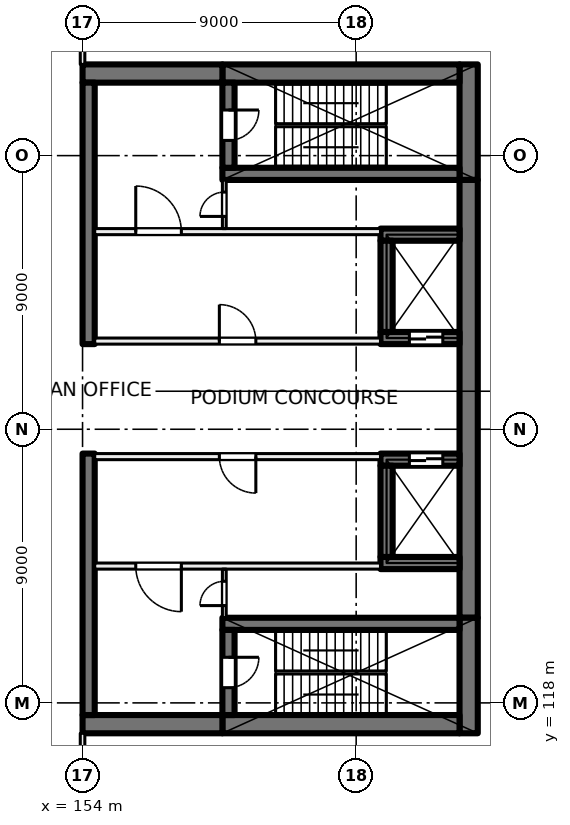
"""IFC4 building model, lengths in metres.
Left out: names, types, materials, properties, quantities, classifications, styles, units other than length and angle.
Written with IfcOpenShell. Run it as: python <this file> out.ifc"""

import sys

from ifc_helpers import new_model, si_unit, direction, frame, frame_2d, origin, place, context, subcontext, project, spatial, rectangle, extrude, element, fill, save


model = new_model("IFC4")
c1 = context("Model", 3, precision=1e-05, world=origin(), true_north=direction((0.0, 1.0)))
c2 = subcontext(c1, "Body", "Model", "MODEL_VIEW")
j1 = project(units=[si_unit("LENGTHUNIT", "METRE"), si_unit("PLANEANGLEUNIT", "RADIAN")], contexts=[c1])
p1 = place(None, origin())
s1 = spatial("IfcSite", under=j1, at=p1, CompositionType="ELEMENT")
p2 = place(p1, origin())
s2 = spatial("IfcBuilding", under=s1, at=p2, CompositionType="ELEMENT")
p3 = place(p2, frame((0.0, 0.0, 17.5)))
s3 = spatial("IfcBuildingStorey", under=s2, at=p3, CompositionType="ELEMENT", Elevation=17.5)
p4 = place(p3, frame((166.7, 139.0, 0.0), z_axis=(0.0, 0.0, 1.0), x_axis=(0.0, -1.0, 0.0)))
e1 = element("IfcWall", 1, at=p4, inside=s3, PredefinedType="SHEAR", context=c2, shape_type="SweptSolid", body=[
    extrude(rectangle(XDim=3.8, YDim=0.6, at=frame_2d((1.9, 0.0))), origin(), (0.0, 0.0, 1.0), 5.0),
])
p5 = place(p3, frame((166.7, 135.2, 0.0), z_axis=(0.0, 0.0, 1.0), x_axis=(0.0, -1.0, 0.0)))
e2 = element("IfcWall", 2, at=p5, inside=s3, PredefinedType="SHEAR", context=c2, shape_type="SweptSolid", body=[
    extrude(rectangle(XDim=14.4, YDim=0.6, at=frame_2d((7.2, 0.0))), origin(), (0.0, 0.0, 1.0), 5.0),
])
p6 = place(p3, frame((166.7, 120.8, 0.0), z_axis=(0.0, 0.0, 1.0), x_axis=(0.0, -1.0, 0.0)))
e3 = element("IfcWall", 3, at=p6, inside=s3, PredefinedType="SHEAR", context=c2, shape_type="SweptSolid", body=[
    extrude(rectangle(XDim=3.8, YDim=0.6, at=frame_2d((1.9, 0.0))), origin(), (0.0, 0.0, 1.0), 5.0),
])
for number, where, z_axis, x_axis in (
    (4, (166.4, 138.7, 0.0), (0.0, 0.0, 1.0), (-1.0, 0.0, 0.0)),
    (5, (166.4, 117.3, 0.0), (0.0, 0.0, 1.0), (-1.0, 0.0, 0.0)),
):
    element("IfcWall", number, at=place(p3, frame(where, z_axis=z_axis, x_axis=x_axis)), inside=s3, PredefinedType="SHEAR", context=c2, shape_type="SweptSolid", body=[
        extrude(rectangle(XDim=7.8, YDim=0.6, at=frame_2d((3.9, 0.0))), origin(), (0.0, 0.0, 1.0), 5.0),
    ])
for number, where, z_axis, x_axis in (
    (6, (158.6, 138.7, 0.0), (0.0, 0.0, 1.0), (-1.0, 0.0, 0.0)),
    (7, (158.6, 117.3, 0.0), (0.0, 0.0, 1.0), (-1.0, 0.0, 0.0)),
):
    element("IfcWall", number, at=place(p3, frame(where, z_axis=z_axis, x_axis=x_axis)), inside=s3, PredefinedType="SHEAR", context=c2, shape_type="SweptSolid", body=[
        extrude(rectangle(XDim=4.6, YDim=0.6, at=frame_2d((2.3, 0.0))), origin(), (0.0, 0.0, 1.0), 5.0),
    ])
p7 = place(p3, frame((166.4, 135.4, 0.0), z_axis=(0.0, 0.0, 1.0), x_axis=(-1.0, 0.0, 0.0)))
e8 = element("IfcWall", 8, at=p7, inside=s3, PredefinedType="SHEAR", context=c2, shape_type="SweptSolid", body=[
    extrude(rectangle(XDim=7.8, YDim=0.4, at=frame_2d((3.9, 0.0))), origin(), (0.0, 0.0, 1.0), 5.0),
])
p8 = place(p3, frame((158.8, 138.4, 0.0), z_axis=(0.0, 0.0, 1.0), x_axis=(0.0, -1.0, 0.0)))
e9 = element("IfcWall", 9, at=p8, inside=s3, PredefinedType="SHEAR", context=c2, shape_type="SweptSolid", body=[
    extrude(rectangle(XDim=2.8, YDim=0.4, at=frame_2d((1.4, 0.0))), origin(), (0.0, 0.0, 1.0), 5.0),
])
p9 = place(p8, frame((0.9, 0.0, 0.0)))
e10 = element("IfcOpeningElement", 10, at=p9, cuts=e9, PredefinedType="OPENING", context=c2, shape_type="SweptSolid", body=[
    extrude(rectangle(XDim=1.0, YDim=2.1, at=frame_2d((0.5, 1.05))), frame((0.0, 0.21, 0.0), z_axis=(0.0, -1.0, 0.0), x_axis=(1.0, 0.0, 0.0)), (0.0, 0.0, 1.0), 0.42),
])
p10 = place(p3, frame((166.4, 120.6, 0.0), z_axis=(0.0, 0.0, 1.0), x_axis=(-1.0, 0.0, 0.0)))
e11 = element("IfcWall", 11, at=p10, inside=s3, PredefinedType="SHEAR", context=c2, shape_type="SweptSolid", body=[
    extrude(rectangle(XDim=7.8, YDim=0.4, at=frame_2d((3.9, 0.0))), origin(), (0.0, 0.0, 1.0), 5.0),
])
p11 = place(p3, frame((158.8, 120.4, 0.0), z_axis=(0.0, 0.0, 1.0), x_axis=(0.0, -1.0, 0.0)))
e12 = element("IfcWall", 12, at=p11, inside=s3, PredefinedType="SHEAR", context=c2, shape_type="SweptSolid", body=[
    extrude(rectangle(XDim=2.8, YDim=0.4, at=frame_2d((1.4, 0.0))), origin(), (0.0, 0.0, 1.0), 5.0),
])
p12 = place(p11, frame((0.9, 0.0, 0.0)))
e13 = element("IfcOpeningElement", 13, at=p12, cuts=e12, PredefinedType="OPENING", context=c2, shape_type="SweptSolid", body=[
    extrude(rectangle(XDim=1.0, YDim=2.1, at=frame_2d((0.5, 1.05))), frame((0.0, 0.21, 0.0), z_axis=(0.0, -1.0, 0.0), x_axis=(1.0, 0.0, 0.0)), (0.0, 0.0, 1.0), 0.42),
])
p13 = place(p3, frame((166.4, 130.0, 0.0), z_axis=(0.0, 0.0, 1.0), x_axis=(-1.0, 0.0, 0.0)))
e14 = element("IfcWall", 14, at=p13, inside=s3, PredefinedType="SHEAR", context=c2, shape_type="SweptSolid", body=[
    extrude(rectangle(XDim=2.6, YDim=0.4, at=frame_2d((1.3, 0.0))), origin(), (0.0, 0.0, 1.0), 5.0),
])
p14 = place(p13, frame((0.55, 0.0, 0.0)))
e15 = element("IfcOpeningElement", 15, at=p14, cuts=e14, PredefinedType="OPENING", context=c2, shape_type="SweptSolid", body=[
    extrude(rectangle(XDim=1.1, YDim=2.1, at=frame_2d((0.55, 1.05))), frame((0.0, 0.21, 0.0), z_axis=(0.0, -1.0, 0.0), x_axis=(1.0, 0.0, 0.0)), (0.0, 0.0, 1.0), 0.42),
])
p15 = place(p3, frame((166.4, 133.4, 0.0), z_axis=(0.0, 0.0, 1.0), x_axis=(-1.0, 0.0, 0.0)))
e16 = element("IfcWall", 16, at=p15, inside=s3, PredefinedType="SHEAR", context=c2, shape_type="SweptSolid", body=[
    extrude(rectangle(XDim=2.6, YDim=0.4, at=frame_2d((1.3, 0.0))), origin(), (0.0, 0.0, 1.0), 5.0),
])
p16 = place(p3, frame((164.0, 133.2, 0.0), z_axis=(0.0, 0.0, 1.0), x_axis=(0.0, -1.0, 0.0)))
e17 = element("IfcWall", 17, at=p16, inside=s3, PredefinedType="SHEAR", context=c2, shape_type="SweptSolid", body=[
    extrude(rectangle(XDim=3.0, YDim=0.4, at=frame_2d((1.5, 0.0))), origin(), (0.0, 0.0, 1.0), 5.0),
])
p17 = place(p3, frame((166.4, 126.0, 0.0), z_axis=(0.0, 0.0, 1.0), x_axis=(-1.0, 0.0, 0.0)))
e18 = element("IfcWall", 18, at=p17, inside=s3, PredefinedType="SHEAR", context=c2, shape_type="SweptSolid", body=[
    extrude(rectangle(XDim=2.6, YDim=0.4, at=frame_2d((1.3, 0.0))), origin(), (0.0, 0.0, 1.0), 5.0),
])
p18 = place(p17, frame((0.55, 0.0, 0.0)))
e19 = element("IfcOpeningElement", 19, at=p18, cuts=e18, PredefinedType="OPENING", context=c2, shape_type="SweptSolid", body=[
    extrude(rectangle(XDim=1.1, YDim=2.1, at=frame_2d((0.55, 1.05))), frame((0.0, 0.21, 0.0), z_axis=(0.0, -1.0, 0.0), x_axis=(1.0, 0.0, 0.0)), (0.0, 0.0, 1.0), 0.42),
])
p19 = place(p3, frame((166.4, 122.6, 0.0), z_axis=(0.0, 0.0, 1.0), x_axis=(-1.0, 0.0, 0.0)))
e20 = element("IfcWall", 20, at=p19, inside=s3, PredefinedType="SHEAR", context=c2, shape_type="SweptSolid", body=[
    extrude(rectangle(XDim=2.6, YDim=0.4, at=frame_2d((1.3, 0.0))), origin(), (0.0, 0.0, 1.0), 5.0),
])
p20 = place(p3, frame((164.0, 125.8, 0.0), z_axis=(0.0, 0.0, 1.0), x_axis=(0.0, -1.0, 0.0)))
e21 = element("IfcWall", 21, at=p20, inside=s3, PredefinedType="SHEAR", context=c2, shape_type="SweptSolid", body=[
    extrude(rectangle(XDim=3.0, YDim=0.4, at=frame_2d((1.5, 0.0))), origin(), (0.0, 0.0, 1.0), 5.0),
])
for number, where, z_axis, x_axis in (
    (22, (154.2, 138.4, 0.0), (0.0, 0.0, 1.0), (0.0, -1.0, 0.0)),
    (23, (154.2, 126.2, 0.0), (0.0, 0.0, 1.0), (0.0, -1.0, 0.0)),
):
    element("IfcWall", number, at=place(p3, frame(where, z_axis=z_axis, x_axis=x_axis)), inside=s3, PredefinedType="SHEAR", context=c2, shape_type="SweptSolid", body=[
        extrude(rectangle(XDim=8.6, YDim=0.4, at=frame_2d((4.3, 0.0))), origin(), (0.0, 0.0, 1.0), 5.0),
    ])
p21 = place(p3, frame((163.8, 126.1, 0.0), z_axis=(0.0, 0.0, 1.0), x_axis=(-1.0, 0.0, 0.0)))
e24 = element("IfcWall", 24, at=p21, inside=s3, PredefinedType="PARTITIONING", context=c2, shape_type="SweptSolid", body=[
    extrude(rectangle(XDim=9.4, YDim=0.2, at=frame_2d((4.7, 0.0))), origin(), (0.0, 0.0, 1.0), 4.6),
])
p22 = place(p21, frame((4.1, 0.0, 0.0)))
e25 = element("IfcOpeningElement", 25, at=p22, cuts=e24, PredefinedType="OPENING", context=c2, shape_type="SweptSolid", body=[
    extrude(rectangle(XDim=1.2, YDim=2.1, at=frame_2d((0.6, 1.05))), frame((0.0, 0.11, 0.0), z_axis=(0.0, -1.0, 0.0), x_axis=(1.0, 0.0, 0.0)), (0.0, 0.0, 1.0), 0.22),
])
p23 = place(p3, frame((163.8, 122.5, 0.0), z_axis=(0.0, 0.0, 1.0), x_axis=(-1.0, 0.0, 0.0)))
e26 = element("IfcWall", 26, at=p23, inside=s3, PredefinedType="PARTITIONING", context=c2, shape_type="SweptSolid", body=[
    extrude(rectangle(XDim=9.4, YDim=0.2, at=frame_2d((4.7, 0.0))), origin(), (0.0, 0.0, 1.0), 4.6),
])
p24 = place(p23, frame((6.55, 0.0, 0.0)))
e27 = element("IfcOpeningElement", 27, at=p24, cuts=e26, PredefinedType="OPENING", context=c2, shape_type="SweptSolid", body=[
    extrude(rectangle(XDim=1.5, YDim=2.1, at=frame_2d((0.75, 1.05))), frame((0.0, 0.11, 0.0), z_axis=(0.0, -1.0, 0.0), x_axis=(1.0, 0.0, 0.0)), (0.0, 0.0, 1.0), 0.22),
])
p25 = place(p3, frame((158.663, 120.8, 0.0), z_axis=(0.0, 0.0, 1.0), x_axis=(0.0, 1.0, 0.0)))
e28 = element("IfcWall", 28, at=p25, inside=s3, PredefinedType="PARTITIONING", context=c2, shape_type="SweptSolid", body=[
    extrude(rectangle(XDim=1.6, YDim=0.125, at=frame_2d((0.8, 0.0))), origin(), (0.0, 0.0, 1.0), 4.6),
])
p26 = place(p25, frame((0.4, 0.0, 0.0)))
e29 = element("IfcOpeningElement", 29, at=p26, cuts=e28, PredefinedType="OPENING", context=c2, shape_type="SweptSolid", body=[
    extrude(rectangle(XDim=0.8, YDim=2.1, at=frame_2d((0.4, 1.05))), frame((0.0, 0.073, 0.0), z_axis=(0.0, -1.0, 0.0), x_axis=(1.0, 0.0, 0.0)), (0.0, 0.0, 1.0), 0.145),
])
p27 = place(p3, frame((154.4, 129.9, 0.0), z_axis=(0.0, 0.0, 1.0), x_axis=(1.0, 0.0, 0.0)))
e30 = element("IfcWall", 30, at=p27, inside=s3, PredefinedType="PARTITIONING", context=c2, shape_type="SweptSolid", body=[
    extrude(rectangle(XDim=9.4, YDim=0.2, at=frame_2d((4.7, 0.0))), origin(), (0.0, 0.0, 1.0), 4.6),
])
p28 = place(p27, frame((4.1, 0.0, 0.0)))
e31 = element("IfcOpeningElement", 31, at=p28, cuts=e30, PredefinedType="OPENING", context=c2, shape_type="SweptSolid", body=[
    extrude(rectangle(XDim=1.2, YDim=2.1, at=frame_2d((0.6, 1.05))), frame((0.0, 0.11, 0.0), z_axis=(0.0, -1.0, 0.0), x_axis=(1.0, 0.0, 0.0)), (0.0, 0.0, 1.0), 0.22),
])
p29 = place(p3, frame((154.4, 133.5, 0.0), z_axis=(0.0, 0.0, 1.0), x_axis=(1.0, 0.0, 0.0)))
e32 = element("IfcWall", 32, at=p29, inside=s3, PredefinedType="PARTITIONING", context=c2, shape_type="SweptSolid", body=[
    extrude(rectangle(XDim=9.4, YDim=0.2, at=frame_2d((4.7, 0.0))), origin(), (0.0, 0.0, 1.0), 4.6),
])
p30 = place(p29, frame((1.35, 0.0, 0.0)))
e33 = element("IfcOpeningElement", 33, at=p30, cuts=e32, PredefinedType="OPENING", context=c2, shape_type="SweptSolid", body=[
    extrude(rectangle(XDim=1.5, YDim=2.1, at=frame_2d((0.75, 1.05))), frame((0.0, 0.11, 0.0), z_axis=(0.0, -1.0, 0.0), x_axis=(1.0, 0.0, 0.0)), (0.0, 0.0, 1.0), 0.22),
])
p31 = place(p3, frame((158.663, 133.6, 0.0), z_axis=(0.0, 0.0, 1.0), x_axis=(0.0, 1.0, 0.0)))
e34 = element("IfcWall", 34, at=p31, inside=s3, PredefinedType="PARTITIONING", context=c2, shape_type="SweptSolid", body=[
    extrude(rectangle(XDim=1.6, YDim=0.125, at=frame_2d((0.8, 0.0))), origin(), (0.0, 0.0, 1.0), 4.6),
])
p32 = place(p31, frame((0.4, 0.0, 0.0)))
e35 = element("IfcOpeningElement", 35, at=p32, cuts=e34, PredefinedType="OPENING", context=c2, shape_type="SweptSolid", body=[
    extrude(rectangle(XDim=0.8, YDim=2.1, at=frame_2d((0.4, 1.05))), frame((0.0, 0.073, 0.0), z_axis=(0.0, -1.0, 0.0), x_axis=(1.0, 0.0, 0.0)), (0.0, 0.0, 1.0), 0.145),
])
p33 = place(p3, frame((154.0, 103.075, 0.0), z_axis=(0.0, 0.0, 1.0), x_axis=(0.0, 1.0, 0.0)))
e36 = element("IfcWall", 36, at=p33, inside=s3, PredefinedType="PARTITIONING", context=c2, shape_type="SweptSolid", body=[
    extrude(rectangle(XDim=13.925, YDim=0.15, at=frame_2d((6.962, 0.0))), origin(), (0.0, 0.0, 1.0), 4.6),
])
p34 = place(p3, frame((154.0, 153.4, 0.0), z_axis=(0.0, 0.0, 1.0), x_axis=(0.0, -1.0, 0.0)))
e37 = element("IfcWall", 37, at=p34, inside=s3, PredefinedType="PARTITIONING", context=c2, shape_type="SweptSolid", body=[
    extrude(rectangle(XDim=14.4, YDim=0.15, at=frame_2d((7.2, 0.0))), origin(), (0.0, 0.0, 1.0), 4.6),
])
p35 = place(p34, frame((11.0, 0.0, 0.0)))
e38 = element("IfcOpeningElement", 38, at=p35, cuts=e37, PredefinedType="OPENING", context=c2, shape_type="SweptSolid", body=[
    extrude(rectangle(XDim=1.8, YDim=2.1, at=frame_2d((0.9, 1.05))), frame((0.0, 0.085, 0.0), z_axis=(0.0, -1.0, 0.0), x_axis=(1.0, 0.0, 0.0)), (0.0, 0.0, 1.0), 0.17),
])
p36 = place(p18, origin())
e39 = element("IfcDoor", 39, at=p36, inside=s3, OperationType="DOUBLE_DOOR_SLIDING", PredefinedType="DOOR", context=c2, shape_type="SweptSolid", body=[
    extrude(rectangle(XDim=1.1, YDim=2.1, at=frame_2d((0.55, 1.05))), frame((0.0, 0.025, 0.0), z_axis=(0.0, -1.0, 0.0), x_axis=(1.0, 0.0, 0.0)), (0.0, 0.0, 1.0), 0.05),
])
fill(e19, e39)
p37 = place(p14, origin())
e40 = element("IfcDoor", 40, at=p37, inside=s3, OperationType="DOUBLE_DOOR_SLIDING", PredefinedType="DOOR", context=c2, shape_type="SweptSolid", body=[
    extrude(rectangle(XDim=1.1, YDim=2.1, at=frame_2d((0.55, 1.05))), frame((0.0, 0.025, 0.0), z_axis=(0.0, -1.0, 0.0), x_axis=(1.0, 0.0, 0.0)), (0.0, 0.0, 1.0), 0.05),
])
fill(e15, e40)
p38 = place(p22, origin())
e41 = element("IfcDoor", 41, at=p38, inside=s3, OperationType="DOUBLE_DOOR_SINGLE_SWING", PredefinedType="DOOR", context=c2, shape_type="SweptSolid", body=[
    extrude(rectangle(XDim=1.2, YDim=2.1, at=frame_2d((0.6, 1.05))), frame((0.0, 0.025, 0.0), z_axis=(0.0, -1.0, 0.0), x_axis=(1.0, 0.0, 0.0)), (0.0, 0.0, 1.0), 0.05),
])
fill(e25, e41)
p39 = place(p24, origin())
e42 = element("IfcDoor", 42, at=p39, inside=s3, OperationType="DOUBLE_DOOR_SINGLE_SWING", PredefinedType="DOOR", context=c2, shape_type="SweptSolid", body=[
    extrude(rectangle(XDim=1.5, YDim=2.1, at=frame_2d((0.75, 1.05))), frame((0.0, 0.025, 0.0), z_axis=(0.0, -1.0, 0.0), x_axis=(1.0, 0.0, 0.0)), (0.0, 0.0, 1.0), 0.05),
])
fill(e27, e42)
p40 = place(p12, origin())
e43 = element("IfcDoor", 43, at=p40, inside=s3, OperationType="SINGLE_SWING_LEFT", PredefinedType="DOOR", context=c2, shape_type="SweptSolid", body=[
    extrude(rectangle(XDim=1.0, YDim=2.1, at=frame_2d((0.5, 1.05))), frame((0.0, 0.025, 0.0), z_axis=(0.0, -1.0, 0.0), x_axis=(1.0, 0.0, 0.0)), (0.0, 0.0, 1.0), 0.05),
])
fill(e13, e43)
p41 = place(p26, origin())
e44 = element("IfcDoor", 44, at=p41, inside=s3, OperationType="SINGLE_SWING_RIGHT", PredefinedType="DOOR", context=c2, shape_type="SweptSolid", body=[
    extrude(rectangle(XDim=0.8, YDim=2.1, at=frame_2d((0.4, 1.05))), frame((0.0, 0.025, 0.0), z_axis=(0.0, -1.0, 0.0), x_axis=(1.0, 0.0, 0.0)), (0.0, 0.0, 1.0), 0.05),
])
fill(e29, e44)
p42 = place(p28, origin())
e45 = element("IfcDoor", 45, at=p42, inside=s3, OperationType="DOUBLE_DOOR_SINGLE_SWING", PredefinedType="DOOR", context=c2, shape_type="SweptSolid", body=[
    extrude(rectangle(XDim=1.2, YDim=2.1, at=frame_2d((0.6, 1.05))), frame((0.0, 0.025, 0.0), z_axis=(0.0, -1.0, 0.0), x_axis=(1.0, 0.0, 0.0)), (0.0, 0.0, 1.0), 0.05),
])
fill(e31, e45)
p43 = place(p30, origin())
e46 = element("IfcDoor", 46, at=p43, inside=s3, OperationType="DOUBLE_DOOR_SINGLE_SWING", PredefinedType="DOOR", context=c2, shape_type="SweptSolid", body=[
    extrude(rectangle(XDim=1.5, YDim=2.1, at=frame_2d((0.75, 1.05))), frame((0.0, 0.025, 0.0), z_axis=(0.0, -1.0, 0.0), x_axis=(1.0, 0.0, 0.0)), (0.0, 0.0, 1.0), 0.05),
])
fill(e33, e46)
p44 = place(p9, origin())
e47 = element("IfcDoor", 47, at=p44, inside=s3, OperationType="SINGLE_SWING_RIGHT", PredefinedType="DOOR", context=c2, shape_type="SweptSolid", body=[
    extrude(rectangle(XDim=1.0, YDim=2.1, at=frame_2d((0.5, 1.05))), frame((0.0, 0.025, 0.0), z_axis=(0.0, -1.0, 0.0), x_axis=(1.0, 0.0, 0.0)), (0.0, 0.0, 1.0), 0.05),
])
fill(e10, e47)
p45 = place(p32, origin())
e48 = element("IfcDoor", 48, at=p45, inside=s3, OperationType="SINGLE_SWING_LEFT", PredefinedType="DOOR", context=c2, shape_type="SweptSolid", body=[
    extrude(rectangle(XDim=0.8, YDim=2.1, at=frame_2d((0.4, 1.05))), frame((0.0, 0.025, 0.0), z_axis=(0.0, -1.0, 0.0), x_axis=(1.0, 0.0, 0.0)), (0.0, 0.0, 1.0), 0.05),
])
fill(e35, e48)
save(model, sys.argv[1])
